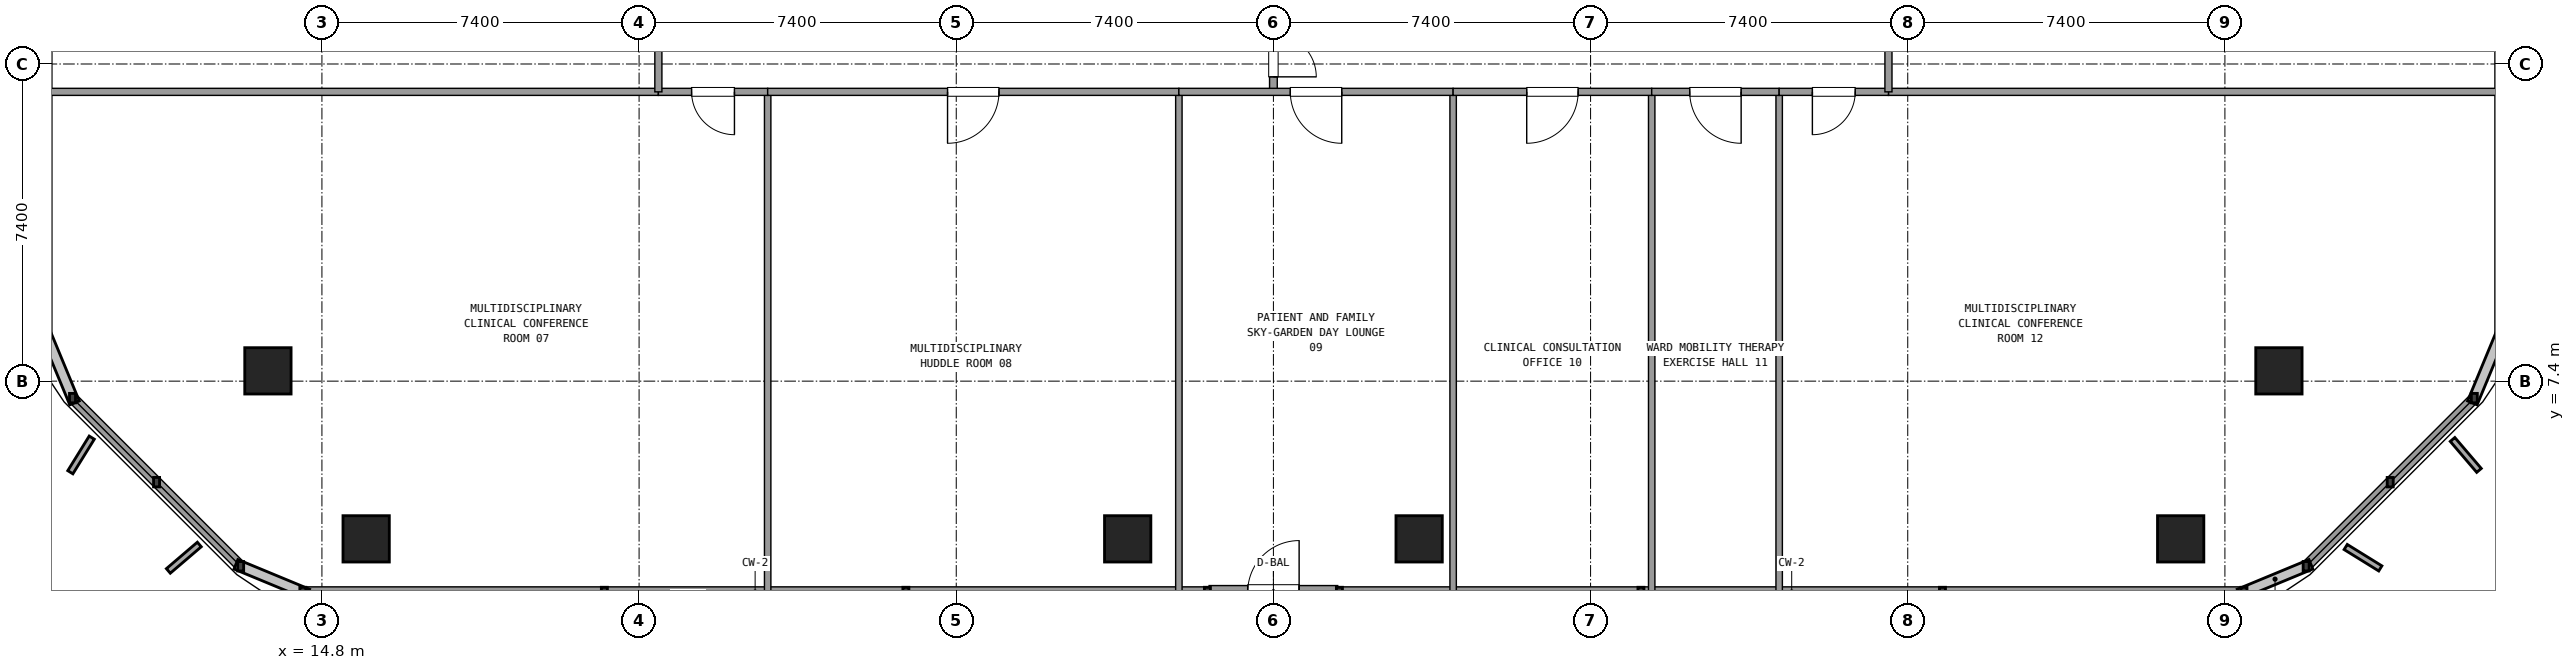
"""IFC4 building model, lengths in metres.
Left out: names, types, materials, properties, quantities, classifications, styles, units other than length and angle.
Written with IfcOpenShell. Run it as: python <this file> out.ifc"""

import sys

from ifc_helpers import new_model, si_unit, direction, frame, frame_2d, origin, origin_2d, place, context, subcontext, project, spatial, rectangle, extrude, element, fill, save


model = new_model("IFC4")
c1 = context("Model", 3, precision=1e-05, world=origin(), true_north=direction((0.0, 1.0)))
c2 = subcontext(c1, "Body", "Model", "MODEL_VIEW")
j1 = project(units=[si_unit("LENGTHUNIT", "METRE"), si_unit("PLANEANGLEUNIT", "RADIAN")], contexts=[c1])
p1 = place(None, origin())
s1 = spatial("IfcSite", under=j1, at=p1, CompositionType="ELEMENT")
p2 = place(p1, origin())
s2 = spatial("IfcBuilding", under=s1, at=p2, CompositionType="ELEMENT")
p3 = place(p2, frame((0.0, 0.0, 38.34)))
s3 = spatial("IfcBuildingStorey", under=s2, at=p3, CompositionType="ELEMENT", Elevation=38.34)
for number, where, z_axis, x_axis in (
    (1, (13.54, 7.64, 0.0), (0.0, 0.0, 1.0), (1.0, 0.0, 0.0)),
    (2, (15.832, 3.72, 0.0), (0.0, 0.0, 1.0), (1.0, 0.0, 0.0)),
    (3, (33.6, 3.72, 0.0), (0.0, 0.0, 1.0), (1.0, 0.0, 0.0)),
    (4, (40.4, 3.72, 0.0), (0.0, 0.0, 1.0), (1.0, 0.0, 0.0)),
    (5, (58.168, 3.72, 0.0), (0.0, 0.0, 1.0), (1.0, 0.0, 0.0)),
    (6, (60.46, 7.64, 0.0), (0.0, 0.0, 1.0), (1.0, 0.0, 0.0)),
):
    element("IfcColumn", number, at=place(p3, frame(where, z_axis=z_axis, x_axis=x_axis)), inside=s3, PredefinedType="COLUMN", context=c2, shape_type="SweptSolid", body=[
        extrude(rectangle(XDim=1.08, YDim=1.08, at=origin_2d()), origin(), (0.0, 0.0, 1.0), 3.6),
    ])
p4 = place(p3, frame((35.5, 2.48, 0.0), z_axis=(0.0, 0.0, 1.0), x_axis=(1.0, 0.0, 0.0)))
e7 = element("IfcWall", 7, at=p4, inside=s3, PredefinedType="SOLIDWALL", context=c2, shape_type="SweptSolid", body=[
    extrude(rectangle(XDim=3.0, YDim=0.3, at=frame_2d((1.5, 0.0))), origin(), (0.0, 0.0, 1.0), 2.65),
])
p5 = place(p4, frame((0.9, 0.0, 0.0)))
e8 = element("IfcOpeningElement", 8, at=p5, cuts=e7, PredefinedType="OPENING", context=c2, shape_type="SweptSolid", body=[
    extrude(rectangle(XDim=1.2, YDim=2.2, at=frame_2d((0.6, 1.1))), frame((0.0, 0.16, 0.0), z_axis=(0.0, -1.0, 0.0), x_axis=(1.0, 0.0, 0.0)), (0.0, 0.0, 1.0), 0.32),
])
for number, where, z_axis, x_axis in (
    (9, (14.355, 2.48, 0.0), (0.0, 0.0, 1.0), (1.0, 0.0, 0.0)),
    (10, (38.54, 2.48, 0.0), (0.0, 0.0, 1.0), (1.0, 0.0, 0.0)),
):
    element("IfcWall", number, at=place(p3, frame(where, z_axis=z_axis, x_axis=x_axis)), inside=s3, PredefinedType="SOLIDWALL", context=c2, shape_type="SweptSolid", body=[
        extrude(rectangle(XDim=21.105, YDim=0.24, at=frame_2d((10.552, 0.0))), origin(), (0.0, 0.0, 1.0), 0.85),
    ])
for number, where, z_axis, x_axis in (
    (11, (61.096, 3.081, 0.0), (0.0, 0.0, 1.0), (0.707, 0.707, 0.0)),
    (12, (8.981, 7.004, 0.0), (0.0, 0.0, 1.0), (0.707, -0.707, 0.0)),
):
    element("IfcWall", number, at=place(p3, frame(where, z_axis=z_axis, x_axis=x_axis)), inside=s3, PredefinedType="SOLIDWALL", context=c2, shape_type="SweptSolid", body=[
        extrude(rectangle(XDim=5.548, YDim=0.24, at=frame_2d((2.774, 0.0))), origin(), (0.0, 0.0, 1.0), 0.85),
    ])
p6 = place(p3, frame((37.0, 14.15, 0.0), z_axis=(0.0, 0.0, 1.0), x_axis=(0.0, 1.0, 0.0)))
e13 = element("IfcWall", 13, at=p6, inside=s3, PredefinedType="PARTITIONING", context=c2, shape_type="SweptSolid", body=[
    extrude(rectangle(XDim=2.7, YDim=0.18, at=frame_2d((1.35, 0.0))), origin(), (0.0, 0.0, 1.0), 2.61),
])
p7 = place(p6, frame((0.35, 0.0, 0.0)))
e14 = element("IfcOpeningElement", 14, at=p7, cuts=e13, PredefinedType="OPENING", context=c2, shape_type="SweptSolid", body=[
    extrude(rectangle(XDim=2.0, YDim=2.2, at=frame_2d((1.0, 1.1))), frame((0.0, 0.1, 0.0), z_axis=(0.0, -1.0, 0.0), x_axis=(1.0, 0.0, 0.0)), (0.0, 0.0, 1.0), 0.2),
])
for number, where, z_axis, x_axis in (
    (15, (8.4, 14.15, 0.0), (0.0, 0.0, 1.0), (1.0, 0.0, 0.0)),
    (16, (51.35, 14.15, 0.0), (0.0, 0.0, 1.0), (1.0, 0.0, 0.0)),
):
    element("IfcWall", number, at=place(p3, frame(where, z_axis=z_axis, x_axis=x_axis)), inside=s3, PredefinedType="PARTITIONING", context=c2, shape_type="SweptSolid", body=[
        extrude(rectangle(XDim=14.25, YDim=0.165, at=frame_2d((7.125, 0.0))), origin(), (0.0, 0.0, 1.0), 2.61),
    ])
p8 = place(p3, frame((25.2, 14.15, 0.0), z_axis=(0.0, 0.0, 1.0), x_axis=(0.0, -1.0, 0.0)))
e17 = element("IfcWall", 17, at=p8, inside=s3, PredefinedType="PARTITIONING", context=c2, shape_type="SweptSolid", body=[
    extrude(rectangle(XDim=11.65, YDim=0.15, at=frame_2d((5.825, 0.0))), origin(), (0.0, 0.0, 1.0), 2.61),
])
p9 = place(p3, frame((22.65, 14.15, 0.0), z_axis=(0.0, 0.0, 1.0), x_axis=(1.0, 0.0, 0.0)))
e18 = element("IfcWall", 18, at=p9, inside=s3, PredefinedType="PARTITIONING", context=c2, shape_type="SweptSolid", body=[
    extrude(rectangle(XDim=2.55, YDim=0.165, at=frame_2d((1.275, 0.0))), origin(), (0.0, 0.0, 1.0), 2.61),
])
p10 = place(p9, frame((0.775, 0.0, 0.0)))
e19 = element("IfcOpeningElement", 19, at=p10, cuts=e18, PredefinedType="OPENING", context=c2, shape_type="SweptSolid", body=[
    extrude(rectangle(XDim=1.0, YDim=2.15, at=frame_2d((0.5, 1.075))), frame((0.0, 0.093, 0.0), z_axis=(0.0, -1.0, 0.0), x_axis=(1.0, 0.0, 0.0)), (0.0, 0.0, 1.0), 0.185),
])
p11 = place(p3, frame((34.794, 14.15, 0.0), z_axis=(0.0, 0.0, 1.0), x_axis=(0.0, -1.0, 0.0)))
e20 = element("IfcWall", 20, at=p11, inside=s3, PredefinedType="PARTITIONING", context=c2, shape_type="SweptSolid", body=[
    extrude(rectangle(XDim=11.65, YDim=0.15, at=frame_2d((5.825, 0.0))), origin(), (0.0, 0.0, 1.0), 2.61),
])
p12 = place(p3, frame((25.2, 14.15, 0.0), z_axis=(0.0, 0.0, 1.0), x_axis=(1.0, 0.0, 0.0)))
e21 = element("IfcWall", 21, at=p12, inside=s3, PredefinedType="PARTITIONING", context=c2, shape_type="SweptSolid", body=[
    extrude(rectangle(XDim=9.594, YDim=0.165, at=frame_2d((4.797, 0.0))), origin(), (0.0, 0.0, 1.0), 2.61),
])
p13 = place(p12, frame((4.197, 0.0, 0.0)))
e22 = element("IfcOpeningElement", 22, at=p13, cuts=e21, PredefinedType="OPENING", context=c2, shape_type="SweptSolid", body=[
    extrude(rectangle(XDim=1.2, YDim=2.15, at=frame_2d((0.6, 1.075))), frame((0.0, 0.093, 0.0), z_axis=(0.0, -1.0, 0.0), x_axis=(1.0, 0.0, 0.0)), (0.0, 0.0, 1.0), 0.185),
])
p14 = place(p3, frame((41.193, 14.15, 0.0), z_axis=(0.0, 0.0, 1.0), x_axis=(0.0, -1.0, 0.0)))
e23 = element("IfcWall", 23, at=p14, inside=s3, PredefinedType="PARTITIONING", context=c2, shape_type="SweptSolid", body=[
    extrude(rectangle(XDim=11.65, YDim=0.15, at=frame_2d((5.825, 0.0))), origin(), (0.0, 0.0, 1.0), 2.61),
])
p15 = place(p3, frame((34.794, 14.15, 0.0), z_axis=(0.0, 0.0, 1.0), x_axis=(1.0, 0.0, 0.0)))
e24 = element("IfcWall", 24, at=p15, inside=s3, PredefinedType="PARTITIONING", context=c2, shape_type="SweptSolid", body=[
    extrude(rectangle(XDim=6.399, YDim=0.165, at=frame_2d((3.2, 0.0))), origin(), (0.0, 0.0, 1.0), 2.61),
])
p16 = place(p15, frame((2.6, 0.0, 0.0)))
e25 = element("IfcOpeningElement", 25, at=p16, cuts=e24, PredefinedType="OPENING", context=c2, shape_type="SweptSolid", body=[
    extrude(rectangle(XDim=1.2, YDim=2.15, at=frame_2d((0.6, 1.075))), frame((0.0, 0.093, 0.0), z_axis=(0.0, -1.0, 0.0), x_axis=(1.0, 0.0, 0.0)), (0.0, 0.0, 1.0), 0.185),
])
p17 = place(p3, frame((45.826, 14.15, 0.0), z_axis=(0.0, 0.0, 1.0), x_axis=(0.0, -1.0, 0.0)))
e26 = element("IfcWall", 26, at=p17, inside=s3, PredefinedType="PARTITIONING", context=c2, shape_type="SweptSolid", body=[
    extrude(rectangle(XDim=11.65, YDim=0.15, at=frame_2d((5.825, 0.0))), origin(), (0.0, 0.0, 1.0), 2.61),
])
p18 = place(p3, frame((41.193, 14.15, 0.0), z_axis=(0.0, 0.0, 1.0), x_axis=(1.0, 0.0, 0.0)))
e27 = element("IfcWall", 27, at=p18, inside=s3, PredefinedType="PARTITIONING", context=c2, shape_type="SweptSolid", body=[
    extrude(rectangle(XDim=4.633, YDim=0.165, at=frame_2d((2.316, 0.0))), origin(), (0.0, 0.0, 1.0), 2.61),
])
p19 = place(p18, frame((1.717, 0.0, 0.0)))
e28 = element("IfcOpeningElement", 28, at=p19, cuts=e27, PredefinedType="OPENING", context=c2, shape_type="SweptSolid", body=[
    extrude(rectangle(XDim=1.2, YDim=2.15, at=frame_2d((0.6, 1.075))), frame((0.0, 0.093, 0.0), z_axis=(0.0, -1.0, 0.0), x_axis=(1.0, 0.0, 0.0)), (0.0, 0.0, 1.0), 0.185),
])
p20 = place(p3, frame((48.8, 14.15, 0.0), z_axis=(0.0, 0.0, 1.0), x_axis=(0.0, -1.0, 0.0)))
e29 = element("IfcWall", 29, at=p20, inside=s3, PredefinedType="PARTITIONING", context=c2, shape_type="SweptSolid", body=[
    extrude(rectangle(XDim=11.65, YDim=0.15, at=frame_2d((5.825, 0.0))), origin(), (0.0, 0.0, 1.0), 2.61),
])
p21 = place(p3, frame((45.826, 14.15, 0.0), z_axis=(0.0, 0.0, 1.0), x_axis=(1.0, 0.0, 0.0)))
e30 = element("IfcWall", 30, at=p21, inside=s3, PredefinedType="PARTITIONING", context=c2, shape_type="SweptSolid", body=[
    extrude(rectangle(XDim=2.974, YDim=0.165, at=frame_2d((1.487, 0.0))), origin(), (0.0, 0.0, 1.0), 2.61),
])
p22 = place(p21, frame((0.887, 0.0, 0.0)))
e31 = element("IfcOpeningElement", 31, at=p22, cuts=e30, PredefinedType="OPENING", context=c2, shape_type="SweptSolid", body=[
    extrude(rectangle(XDim=1.2, YDim=2.15, at=frame_2d((0.6, 1.075))), frame((0.0, 0.093, 0.0), z_axis=(0.0, -1.0, 0.0), x_axis=(1.0, 0.0, 0.0)), (0.0, 0.0, 1.0), 0.185),
])
p23 = place(p3, frame((48.8, 14.15, 0.0), z_axis=(0.0, 0.0, 1.0), x_axis=(1.0, 0.0, 0.0)))
e32 = element("IfcWall", 32, at=p23, inside=s3, PredefinedType="PARTITIONING", context=c2, shape_type="SweptSolid", body=[
    extrude(rectangle(XDim=2.55, YDim=0.165, at=frame_2d((1.275, 0.0))), origin(), (0.0, 0.0, 1.0), 2.61),
])
p24 = place(p23, frame((0.775, 0.0, 0.0)))
e33 = element("IfcOpeningElement", 33, at=p24, cuts=e32, PredefinedType="OPENING", context=c2, shape_type="SweptSolid", body=[
    extrude(rectangle(XDim=1.0, YDim=2.15, at=frame_2d((0.5, 1.075))), frame((0.0, 0.093, 0.0), z_axis=(0.0, -1.0, 0.0), x_axis=(1.0, 0.0, 0.0)), (0.0, 0.0, 1.0), 0.185),
])
p25 = place(p3, frame((22.65, 14.15, 0.0), z_axis=(0.0, 0.0, 1.0), x_axis=(0.0, 1.0, 0.0)))
e34 = element("IfcWall", 34, at=p25, inside=s3, PredefinedType="PARTITIONING", context=c2, shape_type="SweptSolid", body=[
    extrude(rectangle(XDim=6.815, YDim=0.165, at=frame_2d((3.408, 0.0))), origin(), (0.0, 0.0, 1.0), 2.61),
])
p26 = place(p25, frame((2.807, 0.0, 0.0)))
e35 = element("IfcOpeningElement", 35, at=p26, cuts=e34, PredefinedType="OPENING", context=c2, shape_type="SweptSolid", body=[
    extrude(rectangle(XDim=1.2, YDim=2.15, at=frame_2d((0.6, 1.075))), frame((0.0, 0.093, 0.0), z_axis=(0.0, -1.0, 0.0), x_axis=(1.0, 0.0, 0.0)), (0.0, 0.0, 1.0), 0.185),
])
p27 = place(p3, frame((51.35, 14.15, 0.0), z_axis=(0.0, 0.0, 1.0), x_axis=(0.0, 1.0, 0.0)))
e36 = element("IfcWall", 36, at=p27, inside=s3, PredefinedType="PARTITIONING", context=c2, shape_type="SweptSolid", body=[
    extrude(rectangle(XDim=5.922, YDim=0.165, at=frame_2d((2.961, 0.0))), origin(), (0.0, 0.0, 1.0), 2.61),
])
p28 = place(p27, frame((2.361, 0.0, 0.0)))
e37 = element("IfcOpeningElement", 37, at=p28, cuts=e36, PredefinedType="OPENING", context=c2, shape_type="SweptSolid", body=[
    extrude(rectangle(XDim=1.2, YDim=2.15, at=frame_2d((0.6, 1.075))), frame((0.0, 0.093, 0.0), z_axis=(0.0, -1.0, 0.0), x_axis=(1.0, 0.0, 0.0)), (0.0, 0.0, 1.0), 0.185),
])
p29 = place(p7, frame((2.0, 0.0, 0.0), z_axis=(0.0, 0.0, 1.0), x_axis=(-1.0, 0.0, 0.0)))
e38 = element("IfcDoor", 38, at=p29, inside=s3, OperationType="DOUBLE_DOOR_SINGLE_SWING", PredefinedType="DOOR", context=c2, shape_type="SweptSolid", body=[
    extrude(rectangle(XDim=2.0, YDim=2.2, at=frame_2d((1.0, 1.1))), frame((0.0, 0.025, 0.0), z_axis=(0.0, -1.0, 0.0), x_axis=(1.0, 0.0, 0.0)), (0.0, 0.0, 1.0), 0.05),
])
fill(e14, e38)
p30 = place(p10, frame((1.0, 0.0, 0.0), z_axis=(0.0, 0.0, 1.0), x_axis=(-1.0, 0.0, 0.0)))
e39 = element("IfcDoor", 39, at=p30, inside=s3, OperationType="SINGLE_SWING_RIGHT", PredefinedType="DOOR", context=c2, shape_type="SweptSolid", body=[
    extrude(rectangle(XDim=1.0, YDim=2.15, at=frame_2d((0.5, 1.075))), frame((0.0, 0.025, 0.0), z_axis=(0.0, -1.0, 0.0), x_axis=(1.0, 0.0, 0.0)), (0.0, 0.0, 1.0), 0.05),
])
fill(e19, e39)
p31 = place(p13, frame((1.2, 0.0, 0.0), z_axis=(0.0, 0.0, 1.0), x_axis=(-1.0, 0.0, 0.0)))
e40 = element("IfcDoor", 40, at=p31, inside=s3, OperationType="SINGLE_SWING_LEFT", PredefinedType="DOOR", context=c2, shape_type="SweptSolid", body=[
    extrude(rectangle(XDim=1.2, YDim=2.15, at=frame_2d((0.6, 1.075))), frame((0.0, 0.025, 0.0), z_axis=(0.0, -1.0, 0.0), x_axis=(1.0, 0.0, 0.0)), (0.0, 0.0, 1.0), 0.05),
])
fill(e22, e40)
p32 = place(p16, frame((1.2, 0.0, 0.0), z_axis=(0.0, 0.0, 1.0), x_axis=(-1.0, 0.0, 0.0)))
e41 = element("IfcDoor", 41, at=p32, inside=s3, OperationType="SINGLE_SWING_RIGHT", PredefinedType="DOOR", context=c2, shape_type="SweptSolid", body=[
    extrude(rectangle(XDim=1.2, YDim=2.15, at=frame_2d((0.6, 1.075))), frame((0.0, 0.025, 0.0), z_axis=(0.0, -1.0, 0.0), x_axis=(1.0, 0.0, 0.0)), (0.0, 0.0, 1.0), 0.05),
])
fill(e25, e41)
p33 = place(p19, frame((1.2, 0.0, 0.0), z_axis=(0.0, 0.0, 1.0), x_axis=(-1.0, 0.0, 0.0)))
e42 = element("IfcDoor", 42, at=p33, inside=s3, OperationType="SINGLE_SWING_LEFT", PredefinedType="DOOR", context=c2, shape_type="SweptSolid", body=[
    extrude(rectangle(XDim=1.2, YDim=2.15, at=frame_2d((0.6, 1.075))), frame((0.0, 0.025, 0.0), z_axis=(0.0, -1.0, 0.0), x_axis=(1.0, 0.0, 0.0)), (0.0, 0.0, 1.0), 0.05),
])
fill(e28, e42)
p34 = place(p22, frame((1.2, 0.0, 0.0), z_axis=(0.0, 0.0, 1.0), x_axis=(-1.0, 0.0, 0.0)))
e43 = element("IfcDoor", 43, at=p34, inside=s3, OperationType="SINGLE_SWING_RIGHT", PredefinedType="DOOR", context=c2, shape_type="SweptSolid", body=[
    extrude(rectangle(XDim=1.2, YDim=2.15, at=frame_2d((0.6, 1.075))), frame((0.0, 0.025, 0.0), z_axis=(0.0, -1.0, 0.0), x_axis=(1.0, 0.0, 0.0)), (0.0, 0.0, 1.0), 0.05),
])
fill(e31, e43)
p35 = place(p24, frame((1.0, 0.0, 0.0), z_axis=(0.0, 0.0, 1.0), x_axis=(-1.0, 0.0, 0.0)))
e44 = element("IfcDoor", 44, at=p35, inside=s3, OperationType="SINGLE_SWING_LEFT", PredefinedType="DOOR", context=c2, shape_type="SweptSolid", body=[
    extrude(rectangle(XDim=1.0, YDim=2.15, at=frame_2d((0.5, 1.075))), frame((0.0, 0.025, 0.0), z_axis=(0.0, -1.0, 0.0), x_axis=(1.0, 0.0, 0.0)), (0.0, 0.0, 1.0), 0.05),
])
fill(e33, e44)
save(model, sys.argv[1])
